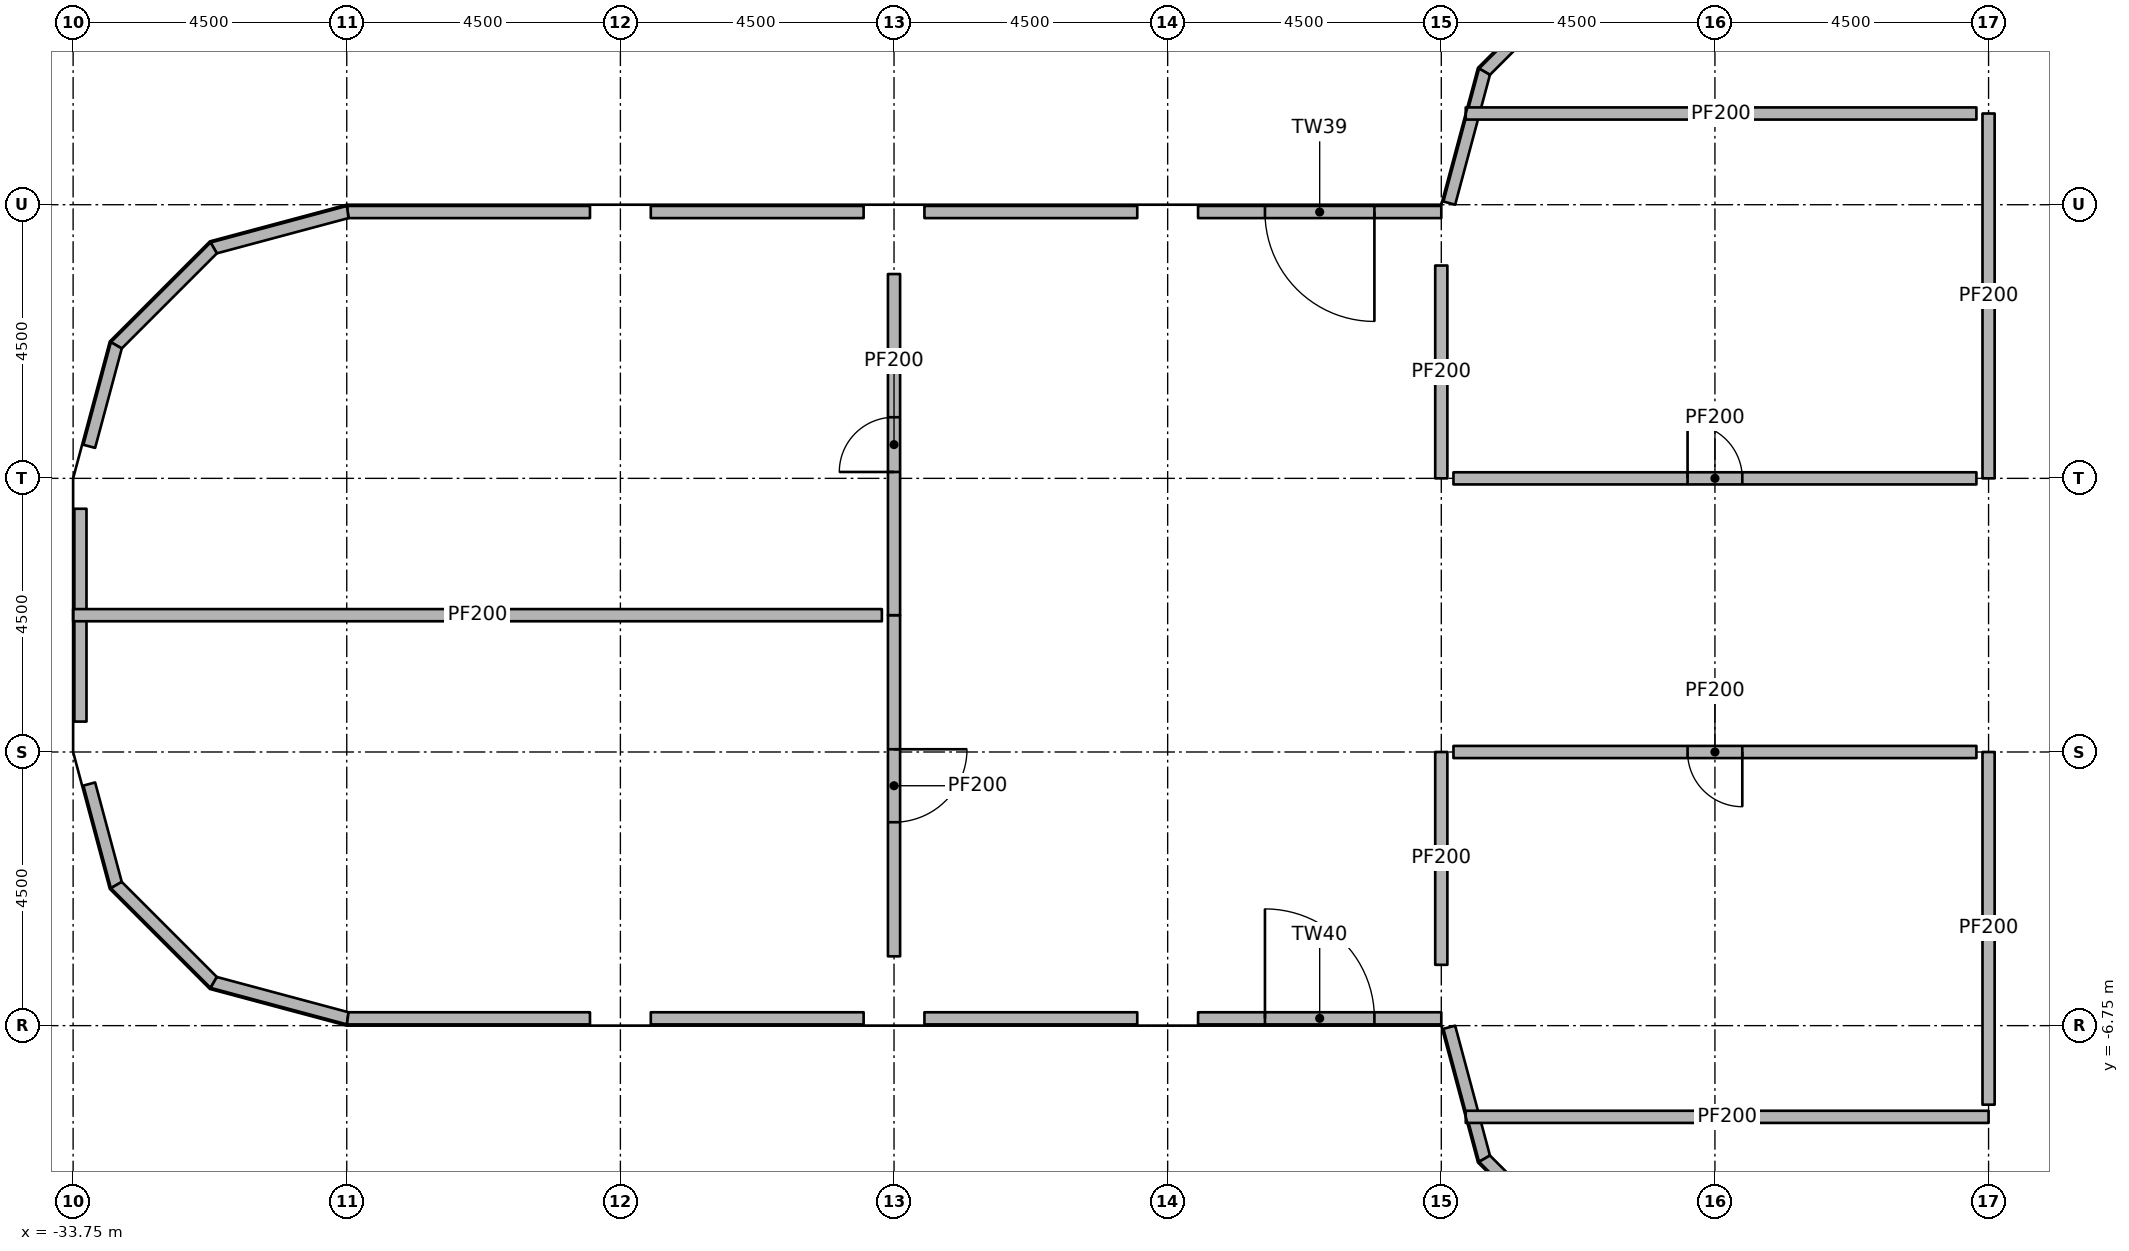
"""IFC4 building model, lengths in metres.
Left out: names, types, materials, properties, quantities, classifications, styles, units other than length and angle.
Written with IfcOpenShell. Run it as: python <this file> out.ifc"""

import sys

from ifc_helpers import new_model, si_unit, direction, frame, frame_2d, origin, origin_2d, place, context, subcontext, project, spatial, polyline, rectangle, outline, extrude, element, fill, save


model = new_model("IFC4")
c1 = context("Model", 3, precision=1e-05, world=origin(), true_north=direction((0.0, 1.0)))
c2 = subcontext(c1, "Body", "Model", "MODEL_VIEW")
j1 = project(units=[si_unit("LENGTHUNIT", "METRE"), si_unit("PLANEANGLEUNIT", "RADIAN")], contexts=[c1])
p1 = place(None, origin())
s1 = spatial("IfcSite", under=j1, at=p1, CompositionType="ELEMENT")
p2 = place(p1, origin())
s2 = spatial("IfcBuilding", under=s1, at=p2, CompositionType="ELEMENT")
p3 = place(p2, frame((0.0, 0.0, 81.6)))
s3 = spatial("IfcBuildingStorey", under=s2, at=p3, CompositionType="ELEMENT", Elevation=81.6)
for number, where, z_axis, x_axis in (
    (1, (-33.11, -2.25, 0.0), (0.0, 0.0, 1.0), (1.0, 0.0, 0.0)),
    (2, (-33.11, 2.25, 0.0), (0.0, 0.0, 1.0), (1.0, 0.0, 0.0)),
    (3, (-28.908, -5.475, 0.0), (0.0, 0.0, 1.0), (1.0, 0.0, 0.0)),
    (4, (-28.908, 5.475, 0.0), (0.0, 0.0, 1.0), (1.0, 0.0, 0.0)),
    (5, (-24.75, -6.25, 0.0), (0.0, 0.0, 1.0), (1.0, 0.0, 0.0)),
    (6, (-24.75, 6.25, 0.0), (0.0, 0.0, 1.0), (1.0, 0.0, 0.0)),
    (7, (-20.25, -6.11, 0.0), (0.0, 0.0, 1.0), (1.0, 0.0, 0.0)),
    (8, (-20.25, 6.11, 0.0), (0.0, 0.0, 1.0), (1.0, 0.0, 0.0)),
    (9, (-15.75, -6.25, 0.0), (0.0, 0.0, 1.0), (1.0, 0.0, 0.0)),
    (10, (-15.75, 6.25, 0.0), (0.0, 0.0, 1.0), (1.0, 0.0, 0.0)),
    (11, (-10.75, -6.25, 0.0), (0.0, 0.0, 1.0), (1.0, 0.0, 0.0)),
    (12, (-10.75, 6.25, 0.0), (0.0, 0.0, 1.0), (1.0, 0.0, 0.0)),
    (13, (-6.25, -6.25, 0.0), (0.0, 0.0, 1.0), (1.0, 0.0, 0.0)),
    (14, (-6.25, 6.25, 0.0), (0.0, 0.0, 1.0), (1.0, 0.0, 0.0)),
):
    element("IfcColumn", number, at=place(p3, frame(where, z_axis=z_axis, x_axis=x_axis)), inside=s3, PredefinedType="COLUMN", context=c2, shape_type="SweptSolid", body=[
        extrude(rectangle(XDim=1.0, YDim=1.0, at=origin_2d()), origin(), (0.0, 0.0, 1.0), 4.85),
    ])
p4 = place(p3, origin())
e15 = element("IfcWall", 15, at=p4, inside=s3, PredefinedType="SOLIDWALL", context=c2, shape_type="SweptSolid", body=[
    extrude(outline(polyline([(-8.99, 10.629), (-10.629, 8.99), (-10.45, 8.886), (-8.886, 10.45), (-8.99, 10.629)])), origin(), (0.0, 0.0, 1.0), 4.85),
])
p5 = place(p3, origin())
e16 = element("IfcWall", 16, at=p5, inside=s3, PredefinedType="SOLIDWALL", context=c2, shape_type="SweptSolid", body=[
    extrude(outline(polyline([(-10.629, 8.99), (-11.215, 6.802), (-11.022, 6.75), (-10.45, 8.886), (-10.629, 8.99)])), origin(), (0.0, 0.0, 1.0), 4.85),
])
p6 = place(p3, frame((-11.25, 6.63, 0.0), z_axis=(0.0, 0.0, 1.0), x_axis=(-1.0, 0.0, 0.0)))
e17 = element("IfcWall", 17, at=p6, inside=s3, PredefinedType="SOLIDWALL", context=c2, shape_type="SweptSolid", body=[
    extrude(rectangle(XDim=4.0, YDim=0.2, at=frame_2d((2.0, 0.0))), origin(), (0.0, 0.0, 1.0), 4.85),
])
p7 = place(p6, frame((1.1, 0.0, 0.0)))
e18 = element("IfcOpeningElement", 18, at=p7, cuts=e17, PredefinedType="OPENING", context=c2, shape_type="SweptSolid", body=[
    extrude(rectangle(XDim=1.8, YDim=2.4, at=frame_2d((0.9, 1.2))), frame((0.0, 0.11, 0.0), z_axis=(0.0, -1.0, 0.0), x_axis=(1.0, 0.0, 0.0)), (0.0, 0.0, 1.0), 0.22),
])
p8 = place(p3, origin())
e19 = element("IfcWall", 19, at=p8, inside=s3, PredefinedType="SOLIDWALL", context=c2, shape_type="SweptSolid", body=[
    extrude(outline(polyline([(-16.25, 6.73), (-19.75, 6.73), (-19.75, 6.53), (-16.25, 6.53), (-16.25, 6.73)])), origin(), (0.0, 0.0, 1.0), 4.85),
])
p9 = place(p3, origin())
e20 = element("IfcWall", 20, at=p9, inside=s3, PredefinedType="SOLIDWALL", context=c2, shape_type="SweptSolid", body=[
    extrude(outline(polyline([(-20.75, 6.73), (-24.25, 6.73), (-24.25, 6.53), (-20.75, 6.53), (-20.75, 6.73)])), origin(), (0.0, 0.0, 1.0), 4.85),
])
p10 = place(p3, origin())
e21 = element("IfcWall", 21, at=p10, inside=s3, PredefinedType="SOLIDWALL", context=c2, shape_type="SweptSolid", body=[
    extrude(outline(polyline([(-25.25, 6.73), (-29.247, 6.73), (-29.221, 6.53), (-25.25, 6.53), (-25.25, 6.73)])), origin(), (0.0, 0.0, 1.0), 4.85),
])
p11 = place(p3, origin())
e22 = element("IfcWall", 22, at=p11, inside=s3, PredefinedType="SOLIDWALL", context=c2, shape_type="SweptSolid", body=[
    extrude(outline(polyline([(-29.247, 6.73), (-31.49, 6.129), (-31.386, 5.95), (-29.221, 6.53), (-29.247, 6.73)])), origin(), (0.0, 0.0, 1.0), 4.85),
])
p12 = place(p3, origin())
e23 = element("IfcWall", 23, at=p12, inside=s3, PredefinedType="SOLIDWALL", context=c2, shape_type="SweptSolid", body=[
    extrude(outline(polyline([(-31.49, 6.129), (-33.129, 4.49), (-32.95, 4.386), (-31.386, 5.95), (-31.49, 6.129)])), origin(), (0.0, 0.0, 1.0), 4.85),
])
p13 = place(p3, origin())
e24 = element("IfcWall", 24, at=p13, inside=s3, PredefinedType="SOLIDWALL", context=c2, shape_type="SweptSolid", body=[
    extrude(outline(polyline([(-33.129, 4.49), (-33.581, 2.802), (-33.388, 2.751), (-32.95, 4.386), (-33.129, 4.49)])), origin(), (0.0, 0.0, 1.0), 4.85),
])
p14 = place(p3, origin())
e25 = element("IfcWall", 25, at=p14, inside=s3, PredefinedType="SOLIDWALL", context=c2, shape_type="SweptSolid", body=[
    extrude(outline(polyline([(-33.73, 1.75), (-33.73, -1.75), (-33.53, -1.75), (-33.53, 1.75), (-33.73, 1.75)])), origin(), (0.0, 0.0, 1.0), 4.85),
])
p15 = place(p3, origin())
e26 = element("IfcWall", 26, at=p15, inside=s3, PredefinedType="SOLIDWALL", context=c2, shape_type="SweptSolid", body=[
    extrude(outline(polyline([(-33.581, -2.802), (-33.129, -4.49), (-32.95, -4.386), (-33.388, -2.75), (-33.581, -2.802)])), origin(), (0.0, 0.0, 1.0), 4.85),
])
p16 = place(p3, origin())
e27 = element("IfcWall", 27, at=p16, inside=s3, PredefinedType="SOLIDWALL", context=c2, shape_type="SweptSolid", body=[
    extrude(outline(polyline([(-33.129, -4.49), (-31.49, -6.129), (-31.386, -5.95), (-32.95, -4.386), (-33.129, -4.49)])), origin(), (0.0, 0.0, 1.0), 4.85),
])
p17 = place(p3, origin())
e28 = element("IfcWall", 28, at=p17, inside=s3, PredefinedType="SOLIDWALL", context=c2, shape_type="SweptSolid", body=[
    extrude(outline(polyline([(-31.49, -6.129), (-29.247, -6.73), (-29.221, -6.53), (-31.386, -5.95), (-31.49, -6.129)])), origin(), (0.0, 0.0, 1.0), 4.85),
])
p18 = place(p3, origin())
e29 = element("IfcWall", 29, at=p18, inside=s3, PredefinedType="SOLIDWALL", context=c2, shape_type="SweptSolid", body=[
    extrude(outline(polyline([(-29.247, -6.73), (-25.25, -6.73), (-25.25, -6.53), (-29.221, -6.53), (-29.247, -6.73)])), origin(), (0.0, 0.0, 1.0), 4.85),
])
p19 = place(p3, origin())
e30 = element("IfcWall", 30, at=p19, inside=s3, PredefinedType="SOLIDWALL", context=c2, shape_type="SweptSolid", body=[
    extrude(outline(polyline([(-24.25, -6.73), (-20.75, -6.73), (-20.75, -6.53), (-24.25, -6.53), (-24.25, -6.73)])), origin(), (0.0, 0.0, 1.0), 4.85),
])
p20 = place(p3, origin())
e31 = element("IfcWall", 31, at=p20, inside=s3, PredefinedType="SOLIDWALL", context=c2, shape_type="SweptSolid", body=[
    extrude(outline(polyline([(-19.75, -6.73), (-16.25, -6.73), (-16.25, -6.53), (-19.75, -6.53), (-19.75, -6.73)])), origin(), (0.0, 0.0, 1.0), 4.85),
])
p21 = place(p3, frame((-15.25, -6.63, 0.0), z_axis=(0.0, 0.0, 1.0), x_axis=(1.0, 0.0, 0.0)))
e32 = element("IfcWall", 32, at=p21, inside=s3, PredefinedType="SOLIDWALL", context=c2, shape_type="SweptSolid", body=[
    extrude(rectangle(XDim=4.0, YDim=0.2, at=frame_2d((2.0, 0.0))), origin(), (0.0, 0.0, 1.0), 4.85),
])
p22 = place(p21, frame((1.1, 0.0, 0.0)))
e33 = element("IfcOpeningElement", 33, at=p22, cuts=e32, PredefinedType="OPENING", context=c2, shape_type="SweptSolid", body=[
    extrude(rectangle(XDim=1.8, YDim=2.4, at=frame_2d((0.9, 1.2))), frame((0.0, 0.11, 0.0), z_axis=(0.0, -1.0, 0.0), x_axis=(1.0, 0.0, 0.0)), (0.0, 0.0, 1.0), 0.22),
])
p23 = place(p3, origin())
e34 = element("IfcWall", 34, at=p23, inside=s3, PredefinedType="SOLIDWALL", context=c2, shape_type="SweptSolid", body=[
    extrude(outline(polyline([(-11.215, -6.802), (-10.629, -8.99), (-10.45, -8.886), (-11.022, -6.75), (-11.215, -6.802)])), origin(), (0.0, 0.0, 1.0), 4.85),
])
p24 = place(p3, origin())
e35 = element("IfcWall", 35, at=p24, inside=s3, PredefinedType="SOLIDWALL", context=c2, shape_type="SweptSolid", body=[
    extrude(outline(polyline([(-10.629, -8.99), (-8.99, -10.629), (-8.886, -10.45), (-10.45, -8.886), (-10.629, -8.99)])), origin(), (0.0, 0.0, 1.0), 4.85),
])
p25 = place(p3, frame((-2.25, 2.25, 0.0), z_axis=(0.0, 0.0, 1.0), x_axis=(0.0, 1.0, 0.0)))
e36 = element("IfcWall", 36, at=p25, inside=s3, PredefinedType="PARTITIONING", context=c2, shape_type="SweptSolid", body=[
    extrude(rectangle(XDim=6.0, YDim=0.2, at=frame_2d((3.0, 0.0))), origin(), (0.0, 0.0, 1.0), 3.918),
])
p26 = place(p3, frame((-2.45, 8.25, 0.0), z_axis=(0.0, 0.0, 1.0), x_axis=(-1.0, 0.0, 0.0)))
e37 = element("IfcWall", 37, at=p26, inside=s3, PredefinedType="PARTITIONING", context=c2, shape_type="SweptSolid", body=[
    extrude(rectangle(XDim=8.398, YDim=0.2, at=frame_2d((4.199, 0.0))), origin(), (0.0, 0.0, 1.0), 3.93),
])
p27 = place(p3, frame((-10.848, -8.25, 0.0), z_axis=(0.0, 0.0, 1.0), x_axis=(1.0, 0.0, 0.0)))
e38 = element("IfcWall", 38, at=p27, inside=s3, PredefinedType="PARTITIONING", context=c2, shape_type="SweptSolid", body=[
    extrude(rectangle(XDim=8.598, YDim=0.2, at=frame_2d((4.299, 0.0))), origin(), (0.0, 0.0, 1.0), 3.93),
])
p28 = place(p3, frame((-2.25, -8.05, 0.0), z_axis=(0.0, 0.0, 1.0), x_axis=(0.0, 1.0, 0.0)))
e39 = element("IfcWall", 39, at=p28, inside=s3, PredefinedType="PARTITIONING", context=c2, shape_type="SweptSolid", body=[
    extrude(rectangle(XDim=5.8, YDim=0.2, at=frame_2d((2.9, 0.0))), origin(), (0.0, 0.0, 1.0), 3.918),
])
p29 = place(p3, frame((-11.25, 2.25, 0.0), z_axis=(0.0, 0.0, 1.0), x_axis=(0.0, 1.0, 0.0)))
e40 = element("IfcWall", 40, at=p29, inside=s3, PredefinedType="PARTITIONING", context=c2, shape_type="SweptSolid", body=[
    extrude(rectangle(XDim=3.5, YDim=0.2, at=frame_2d((1.75, 0.0))), origin(), (0.0, 0.0, 1.0), 4.85),
])
p30 = place(p3, frame((-11.05, 2.25, 0.0), z_axis=(0.0, 0.0, 1.0), x_axis=(1.0, 0.0, 0.0)))
e41 = element("IfcWall", 41, at=p30, inside=s3, PredefinedType="PARTITIONING", context=c2, shape_type="SweptSolid", body=[
    extrude(rectangle(XDim=8.6, YDim=0.2, at=frame_2d((4.3, 0.0))), origin(), (0.0, 0.0, 1.0), 4.073),
])
p31 = place(p30, frame((3.85, 0.0, 0.0)))
e42 = element("IfcOpeningElement", 42, at=p31, cuts=e41, PredefinedType="OPENING", context=c2, shape_type="SweptSolid", body=[
    extrude(rectangle(XDim=0.9, YDim=2.1, at=frame_2d((0.45, 1.05))), frame((0.0, 0.11, 0.0), z_axis=(0.0, -1.0, 0.0), x_axis=(1.0, 0.0, 0.0)), (0.0, 0.0, 1.0), 0.22),
])
p32 = place(p3, frame((-11.25, -5.75, 0.0), z_axis=(0.0, 0.0, 1.0), x_axis=(0.0, 1.0, 0.0)))
e43 = element("IfcWall", 43, at=p32, inside=s3, PredefinedType="PARTITIONING", context=c2, shape_type="SweptSolid", body=[
    extrude(rectangle(XDim=3.5, YDim=0.2, at=frame_2d((1.75, 0.0))), origin(), (0.0, 0.0, 1.0), 4.85),
])
p33 = place(p3, frame((-2.45, -2.25, 0.0), z_axis=(0.0, 0.0, 1.0), x_axis=(-1.0, 0.0, 0.0)))
e44 = element("IfcWall", 44, at=p33, inside=s3, PredefinedType="PARTITIONING", context=c2, shape_type="SweptSolid", body=[
    extrude(rectangle(XDim=8.6, YDim=0.2, at=frame_2d((4.3, 0.0))), origin(), (0.0, 0.0, 1.0), 4.073),
])
p34 = place(p33, frame((3.85, 0.0, 0.0)))
e45 = element("IfcOpeningElement", 45, at=p34, cuts=e44, PredefinedType="OPENING", context=c2, shape_type="SweptSolid", body=[
    extrude(rectangle(XDim=0.9, YDim=2.1, at=frame_2d((0.45, 1.05))), frame((0.0, 0.11, 0.0), z_axis=(0.0, -1.0, 0.0), x_axis=(1.0, 0.0, 0.0)), (0.0, 0.0, 1.0), 0.22),
])
p35 = place(p3, frame((-20.25, 0.0, 0.0), z_axis=(0.0, 0.0, 1.0), x_axis=(0.0, -1.0, 0.0)))
e46 = element("IfcWall", 46, at=p35, inside=s3, PredefinedType="PARTITIONING", context=c2, shape_type="SweptSolid", body=[
    extrude(rectangle(XDim=5.61, YDim=0.2, at=frame_2d((2.805, 0.0))), origin(), (0.0, 0.0, 1.0), 4.073),
])
p36 = place(p35, frame((2.205, 0.0, 0.0)))
e47 = element("IfcOpeningElement", 47, at=p36, cuts=e46, PredefinedType="OPENING", context=c2, shape_type="SweptSolid", body=[
    extrude(rectangle(XDim=1.2, YDim=2.1, at=frame_2d((0.6, 1.05))), frame((0.0, 0.11, 0.0), z_axis=(0.0, -1.0, 0.0), x_axis=(1.0, 0.0, 0.0)), (0.0, 0.0, 1.0), 0.22),
])
p37 = place(p3, frame((-20.25, 0.0, 0.0), z_axis=(0.0, 0.0, 1.0), x_axis=(0.0, 1.0, 0.0)))
e48 = element("IfcWall", 48, at=p37, inside=s3, PredefinedType="PARTITIONING", context=c2, shape_type="SweptSolid", body=[
    extrude(rectangle(XDim=5.61, YDim=0.2, at=frame_2d((2.805, 0.0))), origin(), (0.0, 0.0, 1.0), 4.073),
])
p38 = place(p37, frame((2.355, 0.0, 0.0)))
e49 = element("IfcOpeningElement", 49, at=p38, cuts=e48, PredefinedType="OPENING", context=c2, shape_type="SweptSolid", body=[
    extrude(rectangle(XDim=0.9, YDim=2.1, at=frame_2d((0.45, 1.05))), frame((0.0, 0.11, 0.0), z_axis=(0.0, -1.0, 0.0), x_axis=(1.0, 0.0, 0.0)), (0.0, 0.0, 1.0), 0.22),
])
p39 = place(p3, frame((-33.75, 0.0, 0.0), z_axis=(0.0, 0.0, 1.0), x_axis=(1.0, 0.0, 0.0)))
e50 = element("IfcWall", 50, at=p39, inside=s3, PredefinedType="PARTITIONING", context=c2, shape_type="SweptSolid", body=[
    extrude(rectangle(XDim=13.3, YDim=0.2, at=frame_2d((6.65, 0.0))), origin(), (0.0, 0.0, 1.0), 3.93),
])
p40 = place(p7, origin())
e51 = element("IfcDoor", 51, at=p40, inside=s3, OperationType="SINGLE_SWING_LEFT", PredefinedType="DOOR", context=c2, shape_type="SweptSolid", body=[
    extrude(rectangle(XDim=1.8, YDim=2.4, at=frame_2d((0.9, 1.2))), frame((0.0, 0.025, 0.0), z_axis=(0.0, -1.0, 0.0), x_axis=(1.0, 0.0, 0.0)), (0.0, 0.0, 1.0), 0.05),
])
fill(e18, e51)
p41 = place(p22, origin())
e52 = element("IfcDoor", 52, at=p41, inside=s3, OperationType="SINGLE_SWING_LEFT", PredefinedType="DOOR", context=c2, shape_type="SweptSolid", body=[
    extrude(rectangle(XDim=1.8, YDim=2.4, at=frame_2d((0.9, 1.2))), frame((0.0, 0.025, 0.0), z_axis=(0.0, -1.0, 0.0), x_axis=(1.0, 0.0, 0.0)), (0.0, 0.0, 1.0), 0.05),
])
fill(e33, e52)
p42 = place(p31, origin())
e53 = element("IfcDoor", 53, at=p42, inside=s3, OperationType="SINGLE_SWING_LEFT", PredefinedType="DOOR", context=c2, shape_type="SweptSolid", body=[
    extrude(rectangle(XDim=0.9, YDim=2.1, at=frame_2d((0.45, 1.05))), frame((0.0, 0.025, 0.0), z_axis=(0.0, -1.0, 0.0), x_axis=(1.0, 0.0, 0.0)), (0.0, 0.0, 1.0), 0.05),
])
fill(e42, e53)
p43 = place(p34, origin())
e54 = element("IfcDoor", 54, at=p43, inside=s3, OperationType="SINGLE_SWING_LEFT", PredefinedType="DOOR", context=c2, shape_type="SweptSolid", body=[
    extrude(rectangle(XDim=0.9, YDim=2.1, at=frame_2d((0.45, 1.05))), frame((0.0, 0.025, 0.0), z_axis=(0.0, -1.0, 0.0), x_axis=(1.0, 0.0, 0.0)), (0.0, 0.0, 1.0), 0.05),
])
fill(e45, e54)
p44 = place(p36, origin())
e55 = element("IfcDoor", 55, at=p44, inside=s3, OperationType="SINGLE_SWING_LEFT", PredefinedType="DOOR", context=c2, shape_type="SweptSolid", body=[
    extrude(rectangle(XDim=1.2, YDim=2.1, at=frame_2d((0.6, 1.05))), frame((0.0, 0.025, 0.0), z_axis=(0.0, -1.0, 0.0), x_axis=(1.0, 0.0, 0.0)), (0.0, 0.0, 1.0), 0.05),
])
fill(e47, e55)
p45 = place(p38, origin())
e56 = element("IfcDoor", 56, at=p45, inside=s3, OperationType="SINGLE_SWING_LEFT", PredefinedType="DOOR", context=c2, shape_type="SweptSolid", body=[
    extrude(rectangle(XDim=0.9, YDim=2.1, at=frame_2d((0.45, 1.05))), frame((0.0, 0.025, 0.0), z_axis=(0.0, -1.0, 0.0), x_axis=(1.0, 0.0, 0.0)), (0.0, 0.0, 1.0), 0.05),
])
fill(e49, e56)
save(model, sys.argv[1])
